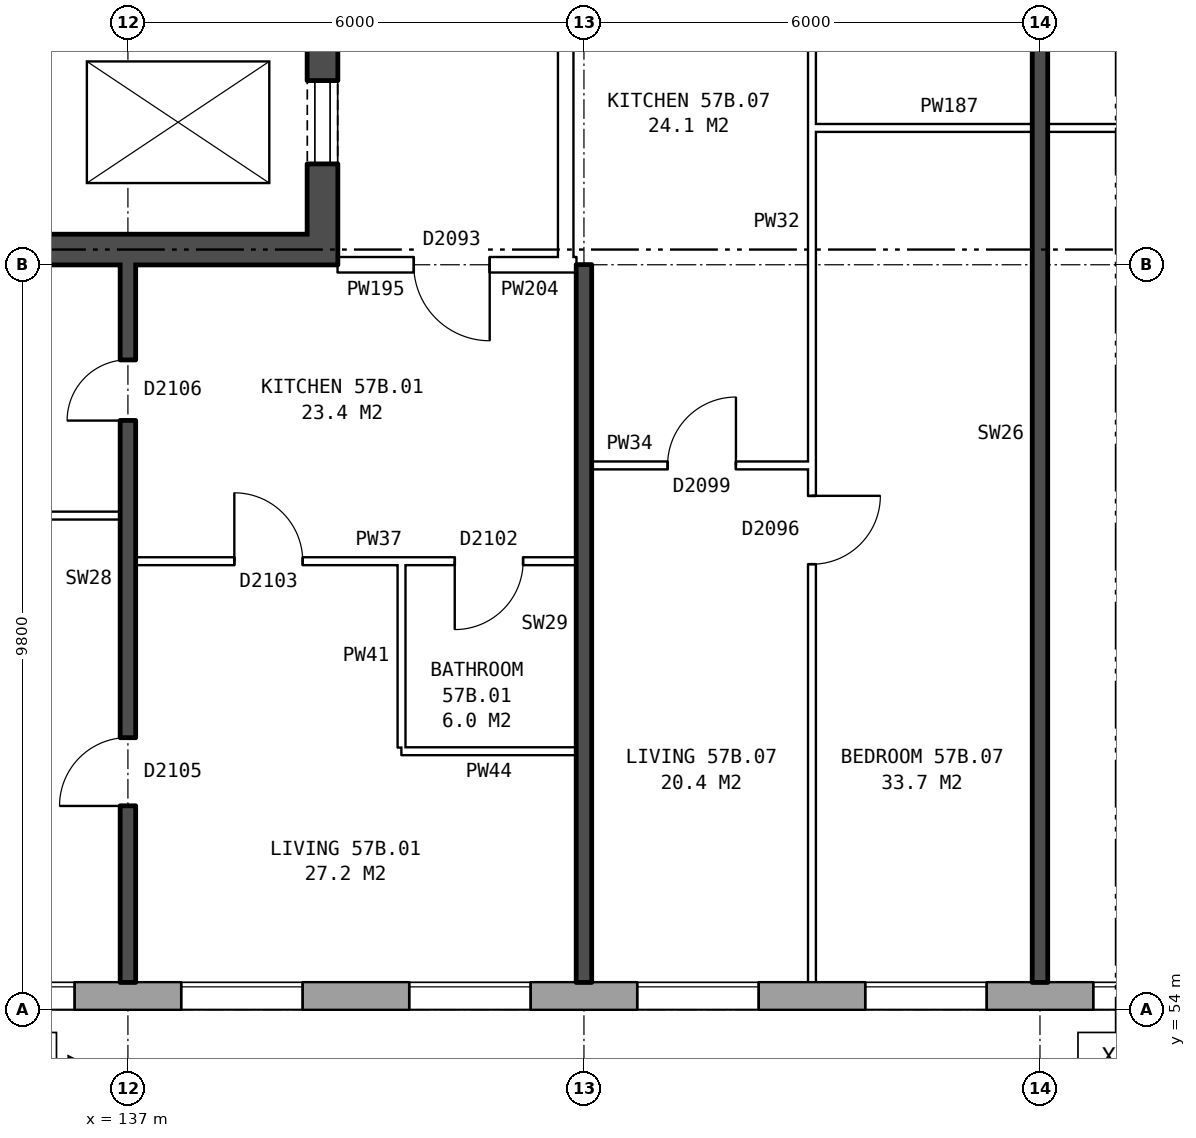
"""IFC4 building model, lengths in metres.
Left out: names, types, materials, properties, quantities, classifications, styles, units other than length and angle.
Written with IfcOpenShell. Run it as: python <this file> out.ifc"""

import sys

from ifc_helpers import new_model, si_unit, direction, frame, frame_2d, origin, place, context, subcontext, project, spatial, rectangle, extrude, element, fill, save


model = new_model("IFC4")
c1 = context("Model", 3, precision=1e-05, world=origin(), true_north=direction((0.0, 1.0)))
c2 = subcontext(c1, "Body", "Model", "MODEL_VIEW")
j1 = project(units=[si_unit("LENGTHUNIT", "METRE"), si_unit("PLANEANGLEUNIT", "RADIAN")], contexts=[c1])
p1 = place(None, origin())
s1 = spatial("IfcSite", under=j1, at=p1, CompositionType="ELEMENT")
p2 = place(p1, origin())
s2 = spatial("IfcBuilding", under=s1, at=p2, CompositionType="ELEMENT")
p3 = place(p2, frame((0.0, 0.0, 202.8)))
s3 = spatial("IfcBuildingStorey", under=s2, at=p3, CompositionType="ELEMENT", Elevation=202.8)
p4 = place(p3, frame((132.05, 54.18, 0.0), z_axis=(0.0, 0.0, 1.0), x_axis=(1.0, 0.0, 0.0)))
e1 = element("IfcWall", 1, at=p4, inside=s3, PredefinedType="STANDARD", context=c2, shape_type="SweptSolid", body=[
    extrude(rectangle(XDim=33.875, YDim=0.36, at=frame_2d((16.938, 0.0))), origin(), (0.0, 0.0, 1.0), 2.85),
])
p5 = place(p4, frame((2.65, 0.0, 0.8)))
e2 = element("IfcOpeningElement", 2, at=p5, cuts=e1, PredefinedType="OPENING", context=c2, shape_type="SweptSolid", body=[
    extrude(rectangle(XDim=1.6, YDim=1.8, at=frame_2d((0.8, 0.9))), frame((0.0, 0.19, 0.0), z_axis=(0.0, -1.0, 0.0), x_axis=(1.0, 0.0, 0.0)), (0.0, 0.0, 1.0), 0.38),
])
p6 = place(p4, frame((5.65, 0.0, 0.8)))
e3 = element("IfcOpeningElement", 3, at=p6, cuts=e1, PredefinedType="OPENING", context=c2, shape_type="SweptSolid", body=[
    extrude(rectangle(XDim=1.6, YDim=1.8, at=frame_2d((0.8, 0.9))), frame((0.0, 0.19, 0.0), z_axis=(0.0, -1.0, 0.0), x_axis=(1.0, 0.0, 0.0)), (0.0, 0.0, 1.0), 0.38),
])
p7 = place(p4, frame((8.65, 0.0, 0.8)))
e4 = element("IfcOpeningElement", 4, at=p7, cuts=e1, PredefinedType="OPENING", context=c2, shape_type="SweptSolid", body=[
    extrude(rectangle(XDim=1.6, YDim=1.8, at=frame_2d((0.8, 0.9))), frame((0.0, 0.19, 0.0), z_axis=(0.0, -1.0, 0.0), x_axis=(1.0, 0.0, 0.0)), (0.0, 0.0, 1.0), 0.38),
])
p8 = place(p4, frame((11.65, 0.0, 0.8)))
e5 = element("IfcOpeningElement", 5, at=p8, cuts=e1, PredefinedType="OPENING", context=c2, shape_type="SweptSolid", body=[
    extrude(rectangle(XDim=1.6, YDim=1.8, at=frame_2d((0.8, 0.9))), frame((0.0, 0.19, 0.0), z_axis=(0.0, -1.0, 0.0), x_axis=(1.0, 0.0, 0.0)), (0.0, 0.0, 1.0), 0.38),
])
p9 = place(p4, frame((14.65, 0.0, 0.8)))
e6 = element("IfcOpeningElement", 6, at=p9, cuts=e1, PredefinedType="OPENING", context=c2, shape_type="SweptSolid", body=[
    extrude(rectangle(XDim=1.6, YDim=1.8, at=frame_2d((0.8, 0.9))), frame((0.0, 0.19, 0.0), z_axis=(0.0, -1.0, 0.0), x_axis=(1.0, 0.0, 0.0)), (0.0, 0.0, 1.0), 0.38),
])
p10 = place(p4, frame((17.65, 0.0, 0.8)))
e7 = element("IfcOpeningElement", 7, at=p10, cuts=e1, PredefinedType="OPENING", context=c2, shape_type="SweptSolid", body=[
    extrude(rectangle(XDim=1.6, YDim=1.8, at=frame_2d((0.8, 0.9))), frame((0.0, 0.19, 0.0), z_axis=(0.0, -1.0, 0.0), x_axis=(1.0, 0.0, 0.0)), (0.0, 0.0, 1.0), 0.38),
])
p11 = place(p4, frame((20.65, 0.0, 0.8)))
e8 = element("IfcOpeningElement", 8, at=p11, cuts=e1, PredefinedType="OPENING", context=c2, shape_type="SweptSolid", body=[
    extrude(rectangle(XDim=1.6, YDim=1.8, at=frame_2d((0.8, 0.9))), frame((0.0, 0.19, 0.0), z_axis=(0.0, -1.0, 0.0), x_axis=(1.0, 0.0, 0.0)), (0.0, 0.0, 1.0), 0.38),
])
p12 = place(p4, frame((23.65, 0.0, 0.8)))
e9 = element("IfcOpeningElement", 9, at=p12, cuts=e1, PredefinedType="OPENING", context=c2, shape_type="SweptSolid", body=[
    extrude(rectangle(XDim=1.6, YDim=1.8, at=frame_2d((0.8, 0.9))), frame((0.0, 0.19, 0.0), z_axis=(0.0, -1.0, 0.0), x_axis=(1.0, 0.0, 0.0)), (0.0, 0.0, 1.0), 0.38),
])
p13 = place(p4, frame((26.65, 0.0, 0.8)))
e10 = element("IfcOpeningElement", 10, at=p13, cuts=e1, PredefinedType="OPENING", context=c2, shape_type="SweptSolid", body=[
    extrude(rectangle(XDim=1.6, YDim=1.8, at=frame_2d((0.8, 0.9))), frame((0.0, 0.19, 0.0), z_axis=(0.0, -1.0, 0.0), x_axis=(1.0, 0.0, 0.0)), (0.0, 0.0, 1.0), 0.38),
])
p14 = place(p4, frame((29.65, 0.0, 0.8)))
e11 = element("IfcOpeningElement", 11, at=p14, cuts=e1, PredefinedType="OPENING", context=c2, shape_type="SweptSolid", body=[
    extrude(rectangle(XDim=1.6, YDim=1.8, at=frame_2d((0.8, 0.9))), frame((0.0, 0.19, 0.0), z_axis=(0.0, -1.0, 0.0), x_axis=(1.0, 0.0, 0.0)), (0.0, 0.0, 1.0), 0.38),
])
p15 = place(p3, frame((139.56, 63.8, 0.0), z_axis=(0.0, 0.0, 1.0), x_axis=(0.0, 1.0, 0.0)))
e12 = element("IfcWall", 12, at=p15, inside=s3, PredefinedType="SHEAR", context=c2, shape_type="SweptSolid", body=[
    extrude(rectangle(XDim=12.4, YDim=0.4, at=frame_2d((6.2, 0.0))), origin(), (0.0, 0.0, 1.0), 2.85),
])
p16 = place(p15, frame((1.325, 0.0, 0.0)))
e13 = element("IfcOpeningElement", 13, at=p16, cuts=e12, PredefinedType="OPENING", context=c2, shape_type="SweptSolid", body=[
    extrude(rectangle(XDim=1.1, YDim=2.1, at=frame_2d((0.55, 1.05))), frame((0.0, 0.21, 0.0), z_axis=(0.0, -1.0, 0.0), x_axis=(1.0, 0.0, 0.0)), (0.0, 0.0, 1.0), 0.42),
])
p17 = place(p15, frame((3.6, 0.0, 0.0)))
e14 = element("IfcOpeningElement", 14, at=p17, cuts=e12, PredefinedType="OPENING", context=c2, shape_type="SweptSolid", body=[
    extrude(rectangle(XDim=1.1, YDim=2.1, at=frame_2d((0.55, 1.05))), frame((0.0, 0.21, 0.0), z_axis=(0.0, -1.0, 0.0), x_axis=(1.0, 0.0, 0.0)), (0.0, 0.0, 1.0), 0.42),
])
p18 = place(p15, frame((5.8, 0.0, 0.0)))
e15 = element("IfcOpeningElement", 15, at=p18, cuts=e12, PredefinedType="OPENING", context=c2, shape_type="SweptSolid", body=[
    extrude(rectangle(XDim=1.1, YDim=2.1, at=frame_2d((0.55, 1.05))), frame((0.0, 0.21, 0.0), z_axis=(0.0, -1.0, 0.0), x_axis=(1.0, 0.0, 0.0)), (0.0, 0.0, 1.0), 0.42),
])
p19 = place(p15, frame((9.9, 0.0, 0.0)))
e16 = element("IfcOpeningElement", 16, at=p19, cuts=e12, PredefinedType="OPENING", context=c2, shape_type="SweptSolid", body=[
    extrude(rectangle(XDim=1.1, YDim=2.1, at=frame_2d((0.55, 1.05))), frame((0.0, 0.21, 0.0), z_axis=(0.0, -1.0, 0.0), x_axis=(1.0, 0.0, 0.0)), (0.0, 0.0, 1.0), 0.42),
])
p20 = place(p15, frame((8.125, 0.0, 0.0)))
e17 = element("IfcOpeningElement", 17, at=p20, cuts=e12, PredefinedType="OPENING", context=c2, shape_type="SweptSolid", body=[
    extrude(rectangle(XDim=0.85, YDim=2.1, at=frame_2d((0.425, 1.05))), frame((0.0, 0.21, 0.0), z_axis=(0.0, -1.0, 0.0), x_axis=(1.0, 0.0, 0.0)), (0.0, 0.0, 1.0), 0.42),
])
p21 = place(p3, frame((139.36, 64.0, 0.0), z_axis=(0.0, 0.0, 1.0), x_axis=(-1.0, 0.0, 0.0)))
e18 = element("IfcWall", 18, at=p21, inside=s3, PredefinedType="SHEAR", context=c2, shape_type="SweptSolid", body=[
    extrude(rectangle(XDim=7.6, YDim=0.4, at=frame_2d((3.8, 0.0))), origin(), (0.0, 0.0, 1.0), 2.85),
])
p22 = place(p3, frame((142.76, 63.9, 0.0), z_axis=(0.0, 0.0, 1.0), x_axis=(0.0, 1.0, 0.0)))
e19 = element("IfcWall", 19, at=p22, inside=s3, PredefinedType="PARTITIONING", context=c2, shape_type="SweptSolid", body=[
    extrude(rectangle(XDim=12.2, YDim=0.2, at=frame_2d((6.1, 0.0))), origin(), (0.0, 0.0, 1.0), 2.85),
])
p23 = place(p22, frame((5.1, 0.0, 0.0)))
e20 = element("IfcOpeningElement", 20, at=p23, cuts=e19, PredefinedType="OPENING", context=c2, shape_type="SweptSolid", body=[
    extrude(rectangle(XDim=2.0, YDim=2.1, at=frame_2d((1.0, 1.05))), frame((0.0, 0.11, 0.0), z_axis=(0.0, -1.0, 0.0), x_axis=(1.0, 0.0, 0.0)), (0.0, 0.0, 1.0), 0.22),
])
p24 = place(p3, frame((140.6, 57.4, 0.0), z_axis=(0.0, 0.0, 1.0), x_axis=(1.0, 0.0, 0.0)))
e21 = element("IfcWall", 21, at=p24, inside=s3, PredefinedType="PARTITIONING", context=c2, shape_type="SweptSolid", body=[
    extrude(rectangle(XDim=2.3, YDim=0.1, at=frame_2d((1.15, 0.0))), origin(), (0.0, 0.0, 1.0), 2.85),
])
p25 = place(p3, frame((137.1, 59.9, 0.0), z_axis=(0.0, 0.0, 1.0), x_axis=(1.0, 0.0, 0.0)))
e22 = element("IfcWall", 22, at=p25, inside=s3, PredefinedType="PARTITIONING", context=c2, shape_type="SweptSolid", body=[
    extrude(rectangle(XDim=5.8, YDim=0.1, at=frame_2d((2.9, 0.0))), origin(), (0.0, 0.0, 1.0), 2.85),
])
p26 = place(p25, frame((1.3, 0.0, 0.0)))
e23 = element("IfcOpeningElement", 23, at=p26, cuts=e22, PredefinedType="OPENING", context=c2, shape_type="SweptSolid", body=[
    extrude(rectangle(XDim=0.9, YDim=2.1, at=frame_2d((0.45, 1.05))), frame((0.0, 0.06, 0.0), z_axis=(0.0, -1.0, 0.0), x_axis=(1.0, 0.0, 0.0)), (0.0, 0.0, 1.0), 0.12),
])
p27 = place(p25, frame((4.2, 0.0, 0.0)))
e24 = element("IfcOpeningElement", 24, at=p27, cuts=e22, PredefinedType="OPENING", context=c2, shape_type="SweptSolid", body=[
    extrude(rectangle(XDim=0.9, YDim=2.1, at=frame_2d((0.45, 1.05))), frame((0.0, 0.06, 0.0), z_axis=(0.0, -1.0, 0.0), x_axis=(1.0, 0.0, 0.0)), (0.0, 0.0, 1.0), 0.12),
])
p28 = place(p3, frame((131.1, 60.5, 0.0), z_axis=(0.0, 0.0, 1.0), x_axis=(1.0, 0.0, 0.0)))
e25 = element("IfcWall", 25, at=p28, inside=s3, PredefinedType="PARTITIONING", context=c2, shape_type="SweptSolid", body=[
    extrude(rectangle(XDim=5.8, YDim=0.1, at=frame_2d((2.9, 0.0))), origin(), (0.0, 0.0, 1.0), 2.85),
])
p29 = place(p3, frame((143.1, 61.16, 0.0), z_axis=(0.0, 0.0, 1.0), x_axis=(1.0, 0.0, 0.0)))
e26 = element("IfcWall", 26, at=p29, inside=s3, PredefinedType="PARTITIONING", context=c2, shape_type="SweptSolid", body=[
    extrude(rectangle(XDim=2.9, YDim=0.1, at=frame_2d((1.45, 0.0))), origin(), (0.0, 0.0, 1.0), 2.85),
])
p30 = place(p29, frame((1.0, 0.0, 0.0)))
e27 = element("IfcOpeningElement", 27, at=p30, cuts=e26, PredefinedType="OPENING", context=c2, shape_type="SweptSolid", body=[
    extrude(rectangle(XDim=0.9, YDim=2.1, at=frame_2d((0.45, 1.05))), frame((0.0, 0.06, 0.0), z_axis=(0.0, -1.0, 0.0), x_axis=(1.0, 0.0, 0.0)), (0.0, 0.0, 1.0), 0.12),
])
p31 = place(p3, frame((139.76, 63.8, 0.0), z_axis=(0.0, 0.0, 1.0), x_axis=(1.0, 0.0, 0.0)))
e28 = element("IfcWall", 28, at=p31, inside=s3, PredefinedType="PARTITIONING", context=c2, shape_type="SweptSolid", body=[
    extrude(rectangle(XDim=3.0, YDim=0.2, at=frame_2d((1.5, 0.0))), origin(), (0.0, 0.0, 1.0), 2.85),
])
p32 = place(p31, frame((1.0, 0.0, 0.0)))
e29 = element("IfcOpeningElement", 29, at=p32, cuts=e28, PredefinedType="OPENING", context=c2, shape_type="SweptSolid", body=[
    extrude(rectangle(XDim=1.0, YDim=2.1, at=frame_2d((0.5, 1.05))), frame((0.0, 0.11, 0.0), z_axis=(0.0, -1.0, 0.0), x_axis=(1.0, 0.0, 0.0)), (0.0, 0.0, 1.0), 0.22),
])
p33 = place(p3, frame((142.76, 63.8, 0.0), z_axis=(0.0, 0.0, 1.0), x_axis=(1.0, 0.0, 0.0)))
e30 = element("IfcWall", 30, at=p33, inside=s3, PredefinedType="PARTITIONING", context=c2, shape_type="SweptSolid", body=[
    extrude(rectangle(XDim=0.14, YDim=0.2, at=frame_2d((0.07, 0.0))), origin(), (0.0, 0.0, 1.0), 2.85),
])
p34 = place(p3, frame((146.0, 65.6, 0.0), z_axis=(0.0, 0.0, 1.0), x_axis=(1.0, 0.0, 0.0)))
e31 = element("IfcWall", 31, at=p34, inside=s3, PredefinedType="PARTITIONING", context=c2, shape_type="SweptSolid", body=[
    extrude(rectangle(XDim=6.0, YDim=0.1, at=frame_2d((3.0, 0.0))), origin(), (0.0, 0.0, 1.0), 2.85),
])
p35 = place(p3, frame((137.0, 54.36, 0.0), z_axis=(0.0, 0.0, 1.0), x_axis=(0.0, 1.0, 0.0)))
e32 = element("IfcWall", 32, at=p35, inside=s3, PredefinedType="SOLIDWALL", context=c2, shape_type="SweptSolid", body=[
    extrude(rectangle(XDim=9.44, YDim=0.2, at=frame_2d((4.72, 0.0))), origin(), (0.0, 0.0, 1.0), 2.85),
])
p36 = place(p35, frame((2.32, 0.0, 0.0)))
e33 = element("IfcOpeningElement", 33, at=p36, cuts=e32, PredefinedType="OPENING", context=c2, shape_type="SweptSolid", body=[
    extrude(rectangle(XDim=0.9, YDim=2.1, at=frame_2d((0.45, 1.05))), frame((0.0, 0.11, 0.0), z_axis=(0.0, -1.0, 0.0), x_axis=(1.0, 0.0, 0.0)), (0.0, 0.0, 1.0), 0.22),
])
p37 = place(p35, frame((7.39, 0.0, 0.0)))
e34 = element("IfcOpeningElement", 34, at=p37, cuts=e32, PredefinedType="OPENING", context=c2, shape_type="SweptSolid", body=[
    extrude(rectangle(XDim=0.8, YDim=2.1, at=frame_2d((0.4, 1.05))), frame((0.0, 0.11, 0.0), z_axis=(0.0, -1.0, 0.0), x_axis=(1.0, 0.0, 0.0)), (0.0, 0.0, 1.0), 0.22),
])
p38 = place(p3, frame((140.6, 57.45, 0.0), z_axis=(0.0, 0.0, 1.0), x_axis=(0.0, 1.0, 0.0)))
e35 = element("IfcWall", 35, at=p38, inside=s3, PredefinedType="PARTITIONING", context=c2, shape_type="SweptSolid", body=[
    extrude(rectangle(XDim=2.4, YDim=0.1, at=frame_2d((1.2, 0.0))), origin(), (0.0, 0.0, 1.0), 2.85),
])
p39 = place(p3, frame((143.0, 54.36, 0.0), z_axis=(0.0, 0.0, 1.0), x_axis=(0.0, 1.0, 0.0)))
e36 = element("IfcWall", 36, at=p39, inside=s3, PredefinedType="SOLIDWALL", context=c2, shape_type="SweptSolid", body=[
    extrude(rectangle(XDim=9.44, YDim=0.2, at=frame_2d((4.72, 0.0))), origin(), (0.0, 0.0, 1.0), 2.85),
])
p40 = place(p3, frame((146.0, 54.36, 0.0), z_axis=(0.0, 0.0, 1.0), x_axis=(0.0, 1.0, 0.0)))
e37 = element("IfcWall", 37, at=p40, inside=s3, PredefinedType="PARTITIONING", context=c2, shape_type="SweptSolid", body=[
    extrude(rectangle(XDim=14.34, YDim=0.1, at=frame_2d((7.17, 0.0))), origin(), (0.0, 0.0, 1.0), 2.85),
])
p41 = place(p40, frame((5.5, 0.0, 0.0)))
e38 = element("IfcOpeningElement", 38, at=p41, cuts=e37, PredefinedType="OPENING", context=c2, shape_type="SweptSolid", body=[
    extrude(rectangle(XDim=0.9, YDim=2.1, at=frame_2d((0.45, 1.05))), frame((0.0, 0.06, 0.0), z_axis=(0.0, -1.0, 0.0), x_axis=(1.0, 0.0, 0.0)), (0.0, 0.0, 1.0), 0.12),
])
p42 = place(p40, frame((13.04, 0.0, 0.0)))
e39 = element("IfcOpeningElement", 39, at=p42, cuts=e37, PredefinedType="OPENING", context=c2, shape_type="SweptSolid", body=[
    extrude(rectangle(XDim=0.9, YDim=2.1, at=frame_2d((0.45, 1.05))), frame((0.0, 0.06, 0.0), z_axis=(0.0, -1.0, 0.0), x_axis=(1.0, 0.0, 0.0)), (0.0, 0.0, 1.0), 0.12),
])
p43 = place(p3, frame((149.0, 54.36, 0.0), z_axis=(0.0, 0.0, 1.0), x_axis=(0.0, 1.0, 0.0)))
e40 = element("IfcWall", 40, at=p43, inside=s3, PredefinedType="SOLIDWALL", context=c2, shape_type="SweptSolid", body=[
    extrude(rectangle(XDim=14.44, YDim=0.2, at=frame_2d((7.22, 0.0))), origin(), (0.0, 0.0, 1.0), 2.85),
])
p44 = place(p5, origin())
e41 = element("IfcWindow", 41, at=p44, inside=s3, PartitioningType="SINGLE_PANEL", PredefinedType="WINDOW", context=c2, shape_type="SweptSolid", body=[
    extrude(rectangle(XDim=1.6, YDim=1.8, at=frame_2d((0.8, 0.9))), frame((0.0, 0.15, 0.0), z_axis=(0.0, -1.0, 0.0), x_axis=(1.0, 0.0, 0.0)), (0.0, 0.0, 1.0), 0.06),
])
fill(e2, e41)
p45 = place(p6, origin())
e42 = element("IfcWindow", 42, at=p45, inside=s3, PartitioningType="SINGLE_PANEL", PredefinedType="WINDOW", context=c2, shape_type="SweptSolid", body=[
    extrude(rectangle(XDim=1.6, YDim=1.8, at=frame_2d((0.8, 0.9))), frame((0.0, 0.15, 0.0), z_axis=(0.0, -1.0, 0.0), x_axis=(1.0, 0.0, 0.0)), (0.0, 0.0, 1.0), 0.06),
])
fill(e3, e42)
p46 = place(p7, origin())
e43 = element("IfcWindow", 43, at=p46, inside=s3, PartitioningType="SINGLE_PANEL", PredefinedType="WINDOW", context=c2, shape_type="SweptSolid", body=[
    extrude(rectangle(XDim=1.6, YDim=1.8, at=frame_2d((0.8, 0.9))), frame((0.0, 0.15, 0.0), z_axis=(0.0, -1.0, 0.0), x_axis=(1.0, 0.0, 0.0)), (0.0, 0.0, 1.0), 0.06),
])
fill(e4, e43)
p47 = place(p8, origin())
e44 = element("IfcWindow", 44, at=p47, inside=s3, PartitioningType="SINGLE_PANEL", PredefinedType="WINDOW", context=c2, shape_type="SweptSolid", body=[
    extrude(rectangle(XDim=1.6, YDim=1.8, at=frame_2d((0.8, 0.9))), frame((0.0, 0.15, 0.0), z_axis=(0.0, -1.0, 0.0), x_axis=(1.0, 0.0, 0.0)), (0.0, 0.0, 1.0), 0.06),
])
fill(e5, e44)
p48 = place(p9, origin())
e45 = element("IfcWindow", 45, at=p48, inside=s3, PartitioningType="SINGLE_PANEL", PredefinedType="WINDOW", context=c2, shape_type="SweptSolid", body=[
    extrude(rectangle(XDim=1.6, YDim=1.8, at=frame_2d((0.8, 0.9))), frame((0.0, 0.15, 0.0), z_axis=(0.0, -1.0, 0.0), x_axis=(1.0, 0.0, 0.0)), (0.0, 0.0, 1.0), 0.06),
])
fill(e6, e45)
p49 = place(p10, origin())
e46 = element("IfcWindow", 46, at=p49, inside=s3, PartitioningType="SINGLE_PANEL", PredefinedType="WINDOW", context=c2, shape_type="SweptSolid", body=[
    extrude(rectangle(XDim=1.6, YDim=1.8, at=frame_2d((0.8, 0.9))), frame((0.0, 0.15, 0.0), z_axis=(0.0, -1.0, 0.0), x_axis=(1.0, 0.0, 0.0)), (0.0, 0.0, 1.0), 0.06),
])
fill(e7, e46)
p50 = place(p16, origin())
e47 = element("IfcDoor", 47, at=p50, inside=s3, OperationType="DOUBLE_DOOR_SLIDING", PredefinedType="DOOR", context=c2, shape_type="SweptSolid", body=[
    extrude(rectangle(XDim=1.1, YDim=2.1, at=frame_2d((0.55, 1.05))), frame((0.0, 0.185, 0.0), z_axis=(0.0, -1.0, 0.0), x_axis=(1.0, 0.0, 0.0)), (0.0, 0.0, 1.0), 0.05),
])
fill(e13, e47)
p51 = place(p36, origin())
e48 = element("IfcDoor", 48, at=p51, inside=s3, OperationType="SINGLE_SWING_LEFT", PredefinedType="DOOR", context=c2, shape_type="SweptSolid", body=[
    extrude(rectangle(XDim=0.9, YDim=2.1, at=frame_2d((0.45, 1.05))), frame((0.0, 0.025, 0.0), z_axis=(0.0, -1.0, 0.0), x_axis=(1.0, 0.0, 0.0)), (0.0, 0.0, 1.0), 0.05),
])
fill(e33, e48)
p52 = place(p32, frame((1.0, 0.0, 0.0), z_axis=(0.0, 0.0, 1.0), x_axis=(-1.0, 0.0, 0.0)))
e49 = element("IfcDoor", 49, at=p52, inside=s3, OperationType="SINGLE_SWING_LEFT", PredefinedType="DOOR", context=c2, shape_type="SweptSolid", body=[
    extrude(rectangle(XDim=1.0, YDim=2.1, at=frame_2d((0.5, 1.05))), frame((0.0, 0.025, 0.0), z_axis=(0.0, -1.0, 0.0), x_axis=(1.0, 0.0, 0.0)), (0.0, 0.0, 1.0), 0.05),
])
fill(e29, e49)
p53 = place(p26, origin())
e50 = element("IfcDoor", 50, at=p53, inside=s3, OperationType="SINGLE_SWING_LEFT", PredefinedType="DOOR", context=c2, shape_type="SweptSolid", body=[
    extrude(rectangle(XDim=0.9, YDim=2.1, at=frame_2d((0.45, 1.05))), frame((0.0, 0.025, 0.0), z_axis=(0.0, -1.0, 0.0), x_axis=(1.0, 0.0, 0.0)), (0.0, 0.0, 1.0), 0.05),
])
fill(e23, e50)
p54 = place(p37, origin())
e51 = element("IfcDoor", 51, at=p54, inside=s3, OperationType="SINGLE_SWING_LEFT", PredefinedType="DOOR", context=c2, shape_type="SweptSolid", body=[
    extrude(rectangle(XDim=0.8, YDim=2.1, at=frame_2d((0.4, 1.05))), frame((0.0, 0.025, 0.0), z_axis=(0.0, -1.0, 0.0), x_axis=(1.0, 0.0, 0.0)), (0.0, 0.0, 1.0), 0.05),
])
fill(e34, e51)
p55 = place(p27, frame((0.9, 0.0, 0.0), z_axis=(0.0, 0.0, 1.0), x_axis=(-1.0, 0.0, 0.0)))
e52 = element("IfcDoor", 52, at=p55, inside=s3, OperationType="SINGLE_SWING_RIGHT", PredefinedType="DOOR", context=c2, shape_type="SweptSolid", body=[
    extrude(rectangle(XDim=0.9, YDim=2.1, at=frame_2d((0.45, 1.05))), frame((0.0, 0.025, 0.0), z_axis=(0.0, -1.0, 0.0), x_axis=(1.0, 0.0, 0.0)), (0.0, 0.0, 1.0), 0.05),
])
fill(e24, e52)
p56 = place(p41, frame((0.9, 0.0, 0.0), z_axis=(0.0, 0.0, 1.0), x_axis=(-1.0, 0.0, 0.0)))
e53 = element("IfcDoor", 53, at=p56, inside=s3, OperationType="SINGLE_SWING_LEFT", PredefinedType="DOOR", context=c2, shape_type="SweptSolid", body=[
    extrude(rectangle(XDim=0.9, YDim=2.1, at=frame_2d((0.45, 1.05))), frame((0.0, 0.025, 0.0), z_axis=(0.0, -1.0, 0.0), x_axis=(1.0, 0.0, 0.0)), (0.0, 0.0, 1.0), 0.05),
])
fill(e38, e53)
p57 = place(p30, origin())
e54 = element("IfcDoor", 54, at=p57, inside=s3, OperationType="SINGLE_SWING_RIGHT", PredefinedType="DOOR", context=c2, shape_type="SweptSolid", body=[
    extrude(rectangle(XDim=0.9, YDim=2.1, at=frame_2d((0.45, 1.05))), frame((0.0, 0.025, 0.0), z_axis=(0.0, -1.0, 0.0), x_axis=(1.0, 0.0, 0.0)), (0.0, 0.0, 1.0), 0.05),
])
fill(e27, e54)
save(model, sys.argv[1])
